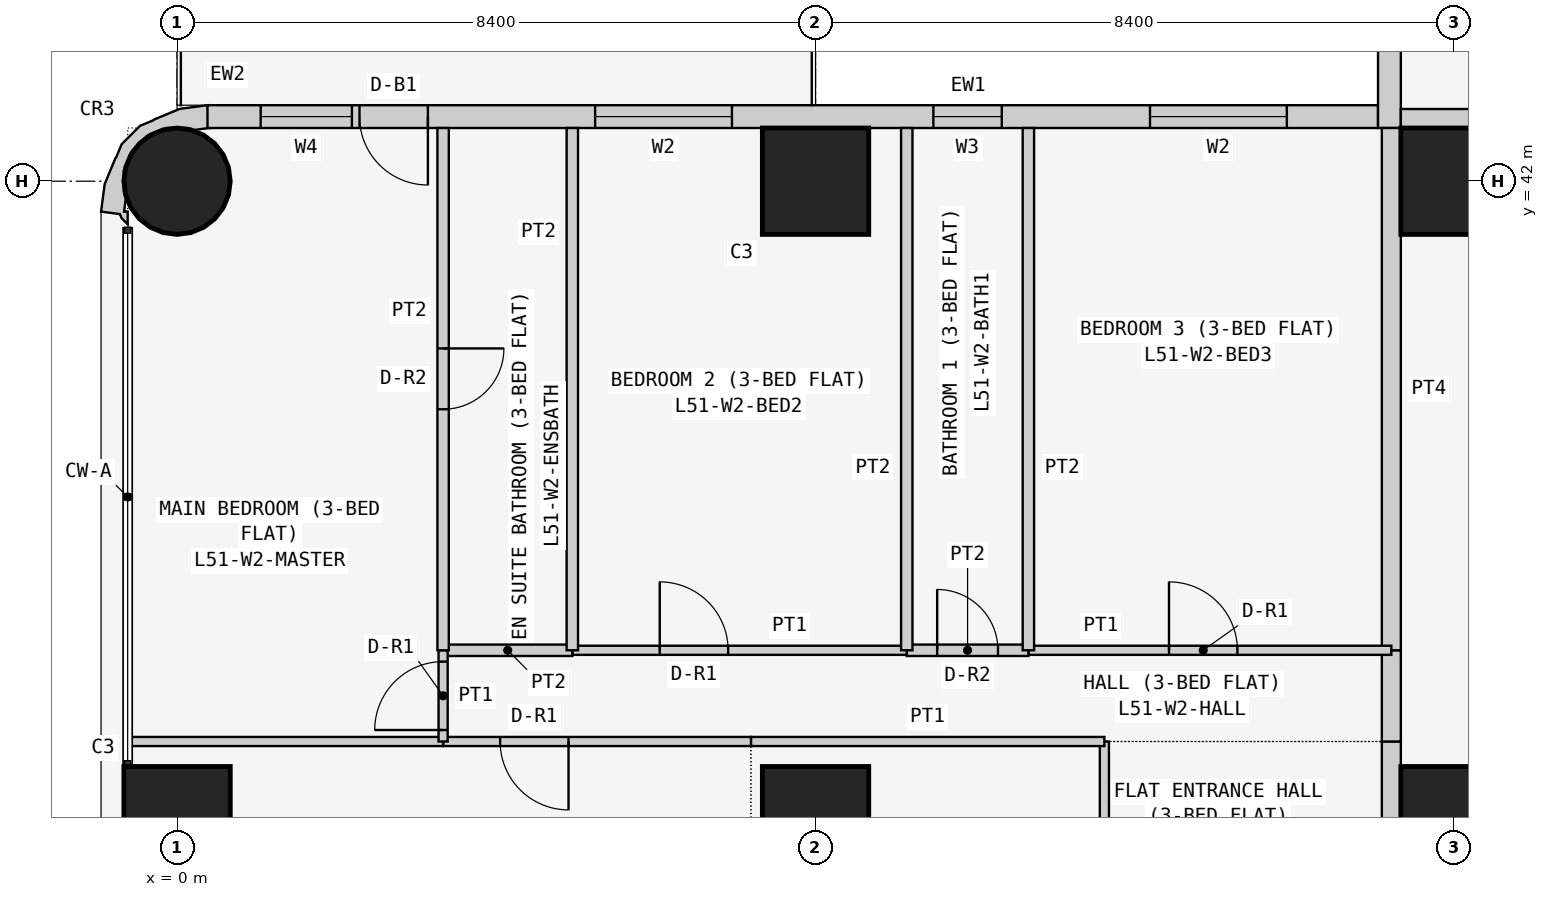
"""IFC4 building model, lengths in metres.
Left out: names, types, materials, properties, quantities, classifications, styles, units other than length and angle.
Written with IfcOpenShell. Run it as: python <this file> out.ifc"""

import sys

from ifc_helpers import new_model, si_unit, direction, frame, frame_2d, origin, origin_2d, place, context, subcontext, project, spatial, polyline, rectangle, circle, outline, extrude, element, fill, save


model = new_model("IFC4")
c1 = context("Model", 3, precision=1e-05, world=origin(), true_north=direction((0.0, 1.0)))
c2 = subcontext(c1, "Body", "Model", "MODEL_VIEW")
j1 = project(units=[si_unit("LENGTHUNIT", "METRE"), si_unit("PLANEANGLEUNIT", "RADIAN")], contexts=[c1])
p1 = place(None, origin())
s1 = spatial("IfcSite", under=j1, at=p1, CompositionType="ELEMENT")
p2 = place(p1, origin())
s2 = spatial("IfcBuilding", under=s1, at=p2, CompositionType="ELEMENT")
p3 = place(p2, frame((0.0, 0.0, 197.7)))
s3 = spatial("IfcBuildingStorey", under=s2, at=p3, CompositionType="ELEMENT", Elevation=197.7)
p4 = place(p3, frame((0.0, 33.6, 0.0), z_axis=(0.0, 0.0, 1.0), x_axis=(1.0, 0.0, 0.0)))
e1 = element("IfcColumn", 1, at=p4, inside=s3, PredefinedType="COLUMN", context=c2, shape_type="SweptSolid", body=[
    extrude(rectangle(XDim=1.4, YDim=1.4, at=origin_2d()), origin(), (0.0, 0.0, 1.0), 3.6),
])
p5 = place(p3, frame((0.0, 42.0, 0.0), z_axis=(0.0, 0.0, 1.0), x_axis=(1.0, 0.0, 0.0)))
e2 = element("IfcColumn", 2, at=p5, inside=s3, PredefinedType="COLUMN", context=c2, shape_type="SweptSolid", body=[
    extrude(circle(Radius=0.7, at=origin_2d()), origin(), (0.0, 0.0, 1.0), 3.6),
])
for number, where, z_axis, x_axis in (
    (3, (8.4, 33.6, 0.0), (0.0, 0.0, 1.0), (1.0, 0.0, 0.0)),
    (4, (8.4, 42.0, 0.0), (0.0, 0.0, 1.0), (1.0, 0.0, 0.0)),
    (5, (16.8, 33.6, 0.0), (0.0, 0.0, 1.0), (1.0, 0.0, 0.0)),
    (6, (16.8, 42.0, 0.0), (0.0, 0.0, 1.0), (1.0, 0.0, 0.0)),
):
    element("IfcColumn", number, at=place(p3, frame(where, z_axis=z_axis, x_axis=x_axis)), inside=s3, PredefinedType="COLUMN", context=c2, shape_type="SweptSolid", body=[
        extrude(rectangle(XDim=1.4, YDim=1.4, at=origin_2d()), origin(), (0.0, 0.0, 1.0), 3.6),
    ])
p6 = place(p3, frame((15.8, 42.85, 0.0), z_axis=(0.0, 0.0, 1.0), x_axis=(-1.0, 0.0, 0.0)))
e7 = element("IfcWall", 7, at=p6, inside=s3, PredefinedType="SOLIDWALL", context=c2, shape_type="SweptSolid", body=[
    extrude(rectangle(XDim=15.4, YDim=0.3, at=frame_2d((7.7, 0.0))), origin(), (0.0, 0.0, 1.0), 3.45),
])
p7 = place(p6, frame((1.2, 0.0, 0.9)))
e8 = element("IfcOpeningElement", 8, at=p7, cuts=e7, PredefinedType="OPENING", context=c2, shape_type="SweptSolid", body=[
    extrude(rectangle(XDim=1.8, YDim=1.5, at=frame_2d((0.9, 0.75))), frame((0.0, 0.16, 0.0), z_axis=(0.0, -1.0, 0.0), x_axis=(1.0, 0.0, 0.0)), (0.0, 0.0, 1.0), 0.32),
])
p8 = place(p6, frame((4.95, 0.0, 1.5)))
e9 = element("IfcOpeningElement", 9, at=p8, cuts=e7, PredefinedType="OPENING", context=c2, shape_type="SweptSolid", body=[
    extrude(rectangle(XDim=0.9, YDim=0.7, at=frame_2d((0.45, 0.35))), frame((0.0, 0.16, 0.0), z_axis=(0.0, -1.0, 0.0), x_axis=(1.0, 0.0, 0.0)), (0.0, 0.0, 1.0), 0.32),
])
p9 = place(p6, frame((8.5, 0.0, 0.9)))
e10 = element("IfcOpeningElement", 10, at=p9, cuts=e7, PredefinedType="OPENING", context=c2, shape_type="SweptSolid", body=[
    extrude(rectangle(XDim=1.8, YDim=1.5, at=frame_2d((0.9, 0.75))), frame((0.0, 0.16, 0.0), z_axis=(0.0, -1.0, 0.0), x_axis=(1.0, 0.0, 0.0)), (0.0, 0.0, 1.0), 0.32),
])
p10 = place(p6, frame((12.5, 0.0, 0.0)))
e11 = element("IfcOpeningElement", 11, at=p10, cuts=e7, PredefinedType="OPENING", context=c2, shape_type="SweptSolid", body=[
    extrude(rectangle(XDim=0.9, YDim=2.4, at=frame_2d((0.45, 1.2))), frame((0.0, 0.16, 0.0), z_axis=(0.0, -1.0, 0.0), x_axis=(1.0, 0.0, 0.0)), (0.0, 0.0, 1.0), 0.32),
])
p11 = place(p6, frame((13.5, 0.0, 0.9)))
e12 = element("IfcOpeningElement", 12, at=p11, cuts=e7, PredefinedType="OPENING", context=c2, shape_type="SweptSolid", body=[
    extrude(rectangle(XDim=1.2, YDim=1.5, at=frame_2d((0.6, 0.75))), frame((0.0, 0.16, 0.0), z_axis=(0.0, -1.0, 0.0), x_axis=(1.0, 0.0, 0.0)), (0.0, 0.0, 1.0), 0.32),
])
p12 = place(p3, frame((15.95, 50.0, 0.0), z_axis=(0.0, 0.0, 1.0), x_axis=(0.0, -1.0, 0.0)))
e13 = element("IfcWall", 13, at=p12, inside=s3, PredefinedType="SOLIDWALL", context=c2, shape_type="SweptSolid", body=[
    extrude(rectangle(XDim=7.3, YDim=0.3, at=frame_2d((3.65, 0.0))), origin(), (0.0, 0.0, 1.0), 3.45),
])
p13 = place(p12, frame((3.1, 0.0, 0.9)))
e14 = element("IfcOpeningElement", 14, at=p13, cuts=e13, PredefinedType="OPENING", context=c2, shape_type="SweptSolid", body=[
    extrude(rectangle(XDim=2.4, YDim=1.5, at=frame_2d((1.2, 0.75))), frame((0.0, 0.16, 0.0), z_axis=(0.0, -1.0, 0.0), x_axis=(1.0, 0.0, 0.0)), (0.0, 0.0, 1.0), 0.32),
])
p14 = place(p12, frame((0.75, 0.0, 0.9)))
e15 = element("IfcOpeningElement", 15, at=p14, cuts=e13, PredefinedType="OPENING", context=c2, shape_type="SweptSolid", body=[
    extrude(rectangle(XDim=1.2, YDim=1.5, at=frame_2d((0.6, 0.75))), frame((0.0, 0.16, 0.0), z_axis=(0.0, -1.0, 0.0), x_axis=(1.0, 0.0, 0.0)), (0.0, 0.0, 1.0), 0.32),
])
p15 = place(p3, frame((0.29, 42.724, 0.0), z_axis=(0.0, 0.0, 1.0), x_axis=(-0.898030234854, 0.439933741929, 0.0)))
e16 = element("IfcWall", 16, at=p15, inside=s3, PredefinedType="SOLIDWALL", context=c2, shape_type="SweptSolid", body=[
    extrude(outline(polyline([(-0.145, -0.044), (0.022, -0.296), (0.327, -0.094), (0.568, 0.18), (0.578, 0.199), (0.7, 0.338), (0.811, 0.661), (0.799, 0.846), (0.803, 0.866), (0.78, 1.231), (0.664, 1.577), (0.426, 1.497), (0.382, 1.536), (0.276, 1.572), (0.349, 1.423), (0.392, 1.444), (0.453, 1.261), (0.51, 1.211), (0.632, 0.961), (0.65, 0.683), (0.56, 0.419), (0.375, 0.21), (0.125, 0.087), (0.05, 0.082), (-0.127, -0.035), (-0.145, -0.044)])), origin(), (0.0, 0.0, 1.0), 3.45),
])
p16 = place(p3, frame((16.1, 42.825, 0.0), z_axis=(0.0, 0.0, 1.0), x_axis=(1.0, 0.0, 0.0)))
e17 = element("IfcWall", 17, at=p16, inside=s3, PredefinedType="PARTITIONING", context=c2, shape_type="SweptSolid", body=[
    extrude(rectangle(XDim=6.871, YDim=0.25, at=frame_2d((3.436, 0.0))), origin(), (0.0, 0.0, 1.0), 3.45),
])
p17 = place(p3, frame((15.975, 29.4, 0.0), z_axis=(0.0, 0.0, 1.0), x_axis=(0.0, 1.0, 0.0)))
e18 = element("IfcWall", 18, at=p17, inside=s3, PredefinedType="PARTITIONING", context=c2, shape_type="SweptSolid", body=[
    extrude(rectangle(XDim=5.229, YDim=0.25, at=frame_2d((2.615, 0.0))), origin(), (0.0, 0.0, 1.0), 3.45),
])
p18 = place(p17, frame((2.1, 0.0, 0.0)))
e19 = element("IfcOpeningElement", 19, at=p18, cuts=e18, PredefinedType="OPENING", context=c2, shape_type="SweptSolid", body=[
    extrude(rectangle(XDim=1.0, YDim=2.1, at=frame_2d((0.5, 1.05))), frame((0.0, 0.135, 0.0), z_axis=(0.0, -1.0, 0.0), x_axis=(1.0, 0.0, 0.0)), (0.0, 0.0, 1.0), 0.27),
])
p19 = place(p3, frame((15.975, 34.629, 0.0), z_axis=(0.0, 0.0, 1.0), x_axis=(0.0, 1.0, 0.0)))
e20 = element("IfcWall", 20, at=p19, inside=s3, PredefinedType="PARTITIONING", context=c2, shape_type="SweptSolid", body=[
    extrude(rectangle(XDim=1.2, YDim=0.25, at=frame_2d((0.6, 0.0))), origin(), (0.0, 0.0, 1.0), 3.45),
])
p20 = place(p3, frame((15.975, 35.829, 0.0), z_axis=(0.0, 0.0, 1.0), x_axis=(0.0, 1.0, 0.0)))
e21 = element("IfcWall", 21, at=p20, inside=s3, PredefinedType="PARTITIONING", context=c2, shape_type="SweptSolid", body=[
    extrude(rectangle(XDim=6.871, YDim=0.25, at=frame_2d((3.436, 0.0))), origin(), (0.0, 0.0, 1.0), 3.45),
])
p21 = place(p3, frame((12.2, 29.4, 0.0), z_axis=(0.0, 0.0, 1.0), x_axis=(0.0, 1.0, 0.0)))
e22 = element("IfcWall", 22, at=p21, inside=s3, PredefinedType="PARTITIONING", context=c2, shape_type="SweptSolid", body=[
    extrude(rectangle(XDim=5.229, YDim=0.12, at=frame_2d((2.615, 0.0))), origin(), (0.0, 0.0, 1.0), 3.45),
])
p22 = place(p21, frame((1.05, 0.0, 0.0)))
e23 = element("IfcOpeningElement", 23, at=p22, cuts=e22, PredefinedType="OPENING", context=c2, shape_type="SweptSolid", body=[
    extrude(rectangle(XDim=0.9, YDim=2.1, at=frame_2d((0.45, 1.05))), frame((0.0, 0.07, 0.0), z_axis=(0.0, -1.0, 0.0), x_axis=(1.0, 0.0, 0.0)), (0.0, 0.0, 1.0), 0.14),
])
p23 = place(p3, frame((7.55, 34.629, 0.0), z_axis=(0.0, 0.0, 1.0), x_axis=(1.0, 0.0, 0.0)))
e24 = element("IfcWall", 24, at=p23, inside=s3, PredefinedType="PARTITIONING", context=c2, shape_type="SweptSolid", body=[
    extrude(rectangle(XDim=4.65, YDim=0.12, at=frame_2d((2.325, 0.0))), origin(), (0.0, 0.0, 1.0), 3.45),
])
p24 = place(p3, frame((3.5, 34.629, 0.0), z_axis=(0.0, 0.0, 1.0), x_axis=(1.0, 0.0, 0.0)))
e25 = element("IfcWall", 25, at=p24, inside=s3, PredefinedType="PARTITIONING", context=c2, shape_type="SweptSolid", body=[
    extrude(rectangle(XDim=4.05, YDim=0.12, at=frame_2d((2.025, 0.0))), origin(), (0.0, 0.0, 1.0), 3.45),
])
p25 = place(p24, frame((0.75, 0.0, 0.0)))
e26 = element("IfcOpeningElement", 26, at=p25, cuts=e25, PredefinedType="OPENING", context=c2, shape_type="SweptSolid", body=[
    extrude(rectangle(XDim=0.9, YDim=2.1, at=frame_2d((0.45, 1.05))), frame((0.0, 0.07, 0.0), z_axis=(0.0, -1.0, 0.0), x_axis=(1.0, 0.0, 0.0)), (0.0, 0.0, 1.0), 0.14),
])
p26 = place(p3, frame((-0.65, 34.629, 0.0), z_axis=(0.0, 0.0, 1.0), x_axis=(1.0, 0.0, 0.0)))
e27 = element("IfcWall", 27, at=p26, inside=s3, PredefinedType="PARTITIONING", context=c2, shape_type="SweptSolid", body=[
    extrude(rectangle(XDim=4.15, YDim=0.12, at=frame_2d((2.075, 0.0))), origin(), (0.0, 0.0, 1.0), 3.45),
])
p27 = place(p3, frame((11.2, 35.829, 0.0), z_axis=(0.0, 0.0, 1.0), x_axis=(1.0, 0.0, 0.0)))
e28 = element("IfcWall", 28, at=p27, inside=s3, PredefinedType="PARTITIONING", context=c2, shape_type="SweptSolid", body=[
    extrude(rectangle(XDim=4.775, YDim=0.12, at=frame_2d((2.388, 0.0))), origin(), (0.0, 0.0, 1.0), 3.45),
])
p28 = place(p27, frame((1.85, 0.0, 0.0)))
e29 = element("IfcOpeningElement", 29, at=p28, cuts=e28, PredefinedType="OPENING", context=c2, shape_type="SweptSolid", body=[
    extrude(rectangle(XDim=0.9, YDim=2.1, at=frame_2d((0.45, 1.05))), frame((0.0, 0.07, 0.0), z_axis=(0.0, -1.0, 0.0), x_axis=(1.0, 0.0, 0.0)), (0.0, 0.0, 1.0), 0.14),
])
p29 = place(p3, frame((9.6, 35.829, 0.0), z_axis=(0.0, 0.0, 1.0), x_axis=(1.0, 0.0, 0.0)))
e30 = element("IfcWall", 30, at=p29, inside=s3, PredefinedType="PARTITIONING", context=c2, shape_type="SweptSolid", body=[
    extrude(rectangle(XDim=1.6, YDim=0.15, at=frame_2d((0.8, 0.0))), origin(), (0.0, 0.0, 1.0), 3.45),
])
p30 = place(p29, frame((0.4, 0.0, 0.0)))
e31 = element("IfcOpeningElement", 31, at=p30, cuts=e30, PredefinedType="OPENING", context=c2, shape_type="SweptSolid", body=[
    extrude(rectangle(XDim=0.8, YDim=2.1, at=frame_2d((0.4, 1.05))), frame((0.0, 0.085, 0.0), z_axis=(0.0, -1.0, 0.0), x_axis=(1.0, 0.0, 0.0)), (0.0, 0.0, 1.0), 0.17),
])
p31 = place(p3, frame((5.2, 35.829, 0.0), z_axis=(0.0, 0.0, 1.0), x_axis=(1.0, 0.0, 0.0)))
e32 = element("IfcWall", 32, at=p31, inside=s3, PredefinedType="PARTITIONING", context=c2, shape_type="SweptSolid", body=[
    extrude(rectangle(XDim=4.4, YDim=0.12, at=frame_2d((2.2, 0.0))), origin(), (0.0, 0.0, 1.0), 3.45),
])
p32 = place(p31, frame((1.15, 0.0, 0.0)))
e33 = element("IfcOpeningElement", 33, at=p32, cuts=e32, PredefinedType="OPENING", context=c2, shape_type="SweptSolid", body=[
    extrude(rectangle(XDim=0.9, YDim=2.1, at=frame_2d((0.45, 1.05))), frame((0.0, 0.07, 0.0), z_axis=(0.0, -1.0, 0.0), x_axis=(1.0, 0.0, 0.0)), (0.0, 0.0, 1.0), 0.14),
])
p33 = place(p3, frame((3.5, 35.829, 0.0), z_axis=(0.0, 0.0, 1.0), x_axis=(1.0, 0.0, 0.0)))
e34 = element("IfcWall", 34, at=p33, inside=s3, PredefinedType="PARTITIONING", context=c2, shape_type="SweptSolid", body=[
    extrude(rectangle(XDim=1.7, YDim=0.15, at=frame_2d((0.85, 0.0))), origin(), (0.0, 0.0, 1.0), 3.45),
])
p34 = place(p3, frame((3.5, 34.629, 0.0), z_axis=(0.0, 0.0, 1.0), x_axis=(0.0, 1.0, 0.0)))
e35 = element("IfcWall", 35, at=p34, inside=s3, PredefinedType="PARTITIONING", context=c2, shape_type="SweptSolid", body=[
    extrude(rectangle(XDim=1.2, YDim=0.12, at=frame_2d((0.6, 0.0))), origin(), (0.0, 0.0, 1.0), 3.45),
])
p35 = place(p34, frame((0.151, 0.0, 0.0)))
e36 = element("IfcOpeningElement", 36, at=p35, cuts=e35, PredefinedType="OPENING", context=c2, shape_type="SweptSolid", body=[
    extrude(rectangle(XDim=0.9, YDim=2.1, at=frame_2d((0.45, 1.05))), frame((0.0, 0.07, 0.0), z_axis=(0.0, -1.0, 0.0), x_axis=(1.0, 0.0, 0.0)), (0.0, 0.0, 1.0), 0.14),
])
for number, where, z_axis, x_axis in (
    (37, (11.2, 35.829, 0.0), (0.0, 0.0, 1.0), (0.0, 1.0, 0.0)),
    (38, (9.6, 35.829, 0.0), (0.0, 0.0, 1.0), (0.0, 1.0, 0.0)),
    (39, (5.2, 35.829, 0.0), (0.0, 0.0, 1.0), (0.0, 1.0, 0.0)),
):
    element("IfcWall", number, at=place(p3, frame(where, z_axis=z_axis, x_axis=x_axis)), inside=s3, PredefinedType="PARTITIONING", context=c2, shape_type="SweptSolid", body=[
        extrude(rectangle(XDim=6.871, YDim=0.15, at=frame_2d((3.436, 0.0))), origin(), (0.0, 0.0, 1.0), 3.45),
    ])
p36 = place(p3, frame((3.5, 35.829, 0.0), z_axis=(0.0, 0.0, 1.0), x_axis=(0.0, 1.0, 0.0)))
e40 = element("IfcWall", 40, at=p36, inside=s3, PredefinedType="PARTITIONING", context=c2, shape_type="SweptSolid", body=[
    extrude(rectangle(XDim=6.871, YDim=0.15, at=frame_2d((3.436, 0.0))), origin(), (0.0, 0.0, 1.0), 3.45),
])
p37 = place(p36, frame((3.171, 0.0, 0.0)))
e41 = element("IfcOpeningElement", 41, at=p37, cuts=e40, PredefinedType="OPENING", context=c2, shape_type="SweptSolid", body=[
    extrude(rectangle(XDim=0.8, YDim=2.1, at=frame_2d((0.4, 1.05))), frame((0.0, 0.085, 0.0), z_axis=(0.0, -1.0, 0.0), x_axis=(1.0, 0.0, 0.0)), (0.0, 0.0, 1.0), 0.17),
])
p38 = place(p7, origin())
e42 = element("IfcWindow", 42, at=p38, inside=s3, PartitioningType="SINGLE_PANEL", PredefinedType="WINDOW", context=c2, shape_type="SweptSolid", body=[
    extrude(rectangle(XDim=1.8, YDim=1.5, at=frame_2d((0.9, 0.75))), frame((0.0, 0.03, 0.0), z_axis=(0.0, -1.0, 0.0), x_axis=(1.0, 0.0, 0.0)), (0.0, 0.0, 1.0), 0.06),
])
fill(e8, e42)
p39 = place(p8, origin())
e43 = element("IfcWindow", 43, at=p39, inside=s3, PartitioningType="SINGLE_PANEL", PredefinedType="WINDOW", context=c2, shape_type="SweptSolid", body=[
    extrude(rectangle(XDim=0.9, YDim=0.7, at=frame_2d((0.45, 0.35))), frame((0.0, 0.03, 0.0), z_axis=(0.0, -1.0, 0.0), x_axis=(1.0, 0.0, 0.0)), (0.0, 0.0, 1.0), 0.06),
])
fill(e9, e43)
p40 = place(p9, origin())
e44 = element("IfcWindow", 44, at=p40, inside=s3, PartitioningType="SINGLE_PANEL", PredefinedType="WINDOW", context=c2, shape_type="SweptSolid", body=[
    extrude(rectangle(XDim=1.8, YDim=1.5, at=frame_2d((0.9, 0.75))), frame((0.0, 0.03, 0.0), z_axis=(0.0, -1.0, 0.0), x_axis=(1.0, 0.0, 0.0)), (0.0, 0.0, 1.0), 0.06),
])
fill(e10, e44)
p41 = place(p10, origin())
e45 = element("IfcDoor", 45, at=p41, inside=s3, OperationType="SINGLE_SWING_LEFT", PredefinedType="DOOR", context=c2, shape_type="SweptSolid", body=[
    extrude(rectangle(XDim=0.9, YDim=2.4, at=frame_2d((0.45, 1.2))), frame((0.0, 0.025, 0.0), z_axis=(0.0, -1.0, 0.0), x_axis=(1.0, 0.0, 0.0)), (0.0, 0.0, 1.0), 0.05),
])
fill(e11, e45)
p42 = place(p11, origin())
e46 = element("IfcWindow", 46, at=p42, inside=s3, PartitioningType="SINGLE_PANEL", PredefinedType="WINDOW", context=c2, shape_type="SweptSolid", body=[
    extrude(rectangle(XDim=1.2, YDim=1.5, at=frame_2d((0.6, 0.75))), frame((0.0, 0.03, 0.0), z_axis=(0.0, -1.0, 0.0), x_axis=(1.0, 0.0, 0.0)), (0.0, 0.0, 1.0), 0.06),
])
fill(e12, e46)
p43 = place(p25, frame((0.9, 0.0, 0.0), z_axis=(0.0, 0.0, 1.0), x_axis=(-1.0, 0.0, 0.0)))
e47 = element("IfcDoor", 47, at=p43, inside=s3, OperationType="SINGLE_SWING_LEFT", PredefinedType="DOOR", context=c2, shape_type="SweptSolid", body=[
    extrude(rectangle(XDim=0.9, YDim=2.1, at=frame_2d((0.45, 1.05))), frame((0.0, 0.025, 0.0), z_axis=(0.0, -1.0, 0.0), x_axis=(1.0, 0.0, 0.0)), (0.0, 0.0, 1.0), 0.05),
])
fill(e26, e47)
p44 = place(p28, origin())
e48 = element("IfcDoor", 48, at=p44, inside=s3, OperationType="SINGLE_SWING_LEFT", PredefinedType="DOOR", context=c2, shape_type="SweptSolid", body=[
    extrude(rectangle(XDim=0.9, YDim=2.1, at=frame_2d((0.45, 1.05))), frame((0.0, 0.025, 0.0), z_axis=(0.0, -1.0, 0.0), x_axis=(1.0, 0.0, 0.0)), (0.0, 0.0, 1.0), 0.05),
])
fill(e29, e48)
p45 = place(p30, origin())
e49 = element("IfcDoor", 49, at=p45, inside=s3, OperationType="SINGLE_SWING_LEFT", PredefinedType="DOOR", context=c2, shape_type="SweptSolid", body=[
    extrude(rectangle(XDim=0.8, YDim=2.1, at=frame_2d((0.4, 1.05))), frame((0.0, 0.025, 0.0), z_axis=(0.0, -1.0, 0.0), x_axis=(1.0, 0.0, 0.0)), (0.0, 0.0, 1.0), 0.05),
])
fill(e31, e49)
p46 = place(p32, origin())
e50 = element("IfcDoor", 50, at=p46, inside=s3, OperationType="SINGLE_SWING_LEFT", PredefinedType="DOOR", context=c2, shape_type="SweptSolid", body=[
    extrude(rectangle(XDim=0.9, YDim=2.1, at=frame_2d((0.45, 1.05))), frame((0.0, 0.025, 0.0), z_axis=(0.0, -1.0, 0.0), x_axis=(1.0, 0.0, 0.0)), (0.0, 0.0, 1.0), 0.05),
])
fill(e33, e50)
p47 = place(p35, origin())
e51 = element("IfcDoor", 51, at=p47, inside=s3, OperationType="SINGLE_SWING_LEFT", PredefinedType="DOOR", context=c2, shape_type="SweptSolid", body=[
    extrude(rectangle(XDim=0.9, YDim=2.1, at=frame_2d((0.45, 1.05))), frame((0.0, 0.025, 0.0), z_axis=(0.0, -1.0, 0.0), x_axis=(1.0, 0.0, 0.0)), (0.0, 0.0, 1.0), 0.05),
])
fill(e36, e51)
p48 = place(p37, frame((0.8, 0.0, 0.0), z_axis=(0.0, 0.0, 1.0), x_axis=(-1.0, 0.0, 0.0)))
e52 = element("IfcDoor", 52, at=p48, inside=s3, OperationType="SINGLE_SWING_LEFT", PredefinedType="DOOR", context=c2, shape_type="SweptSolid", body=[
    extrude(rectangle(XDim=0.8, YDim=2.1, at=frame_2d((0.4, 1.05))), frame((0.0, 0.025, 0.0), z_axis=(0.0, -1.0, 0.0), x_axis=(1.0, 0.0, 0.0)), (0.0, 0.0, 1.0), 0.05),
])
fill(e41, e52)
save(model, sys.argv[1])
